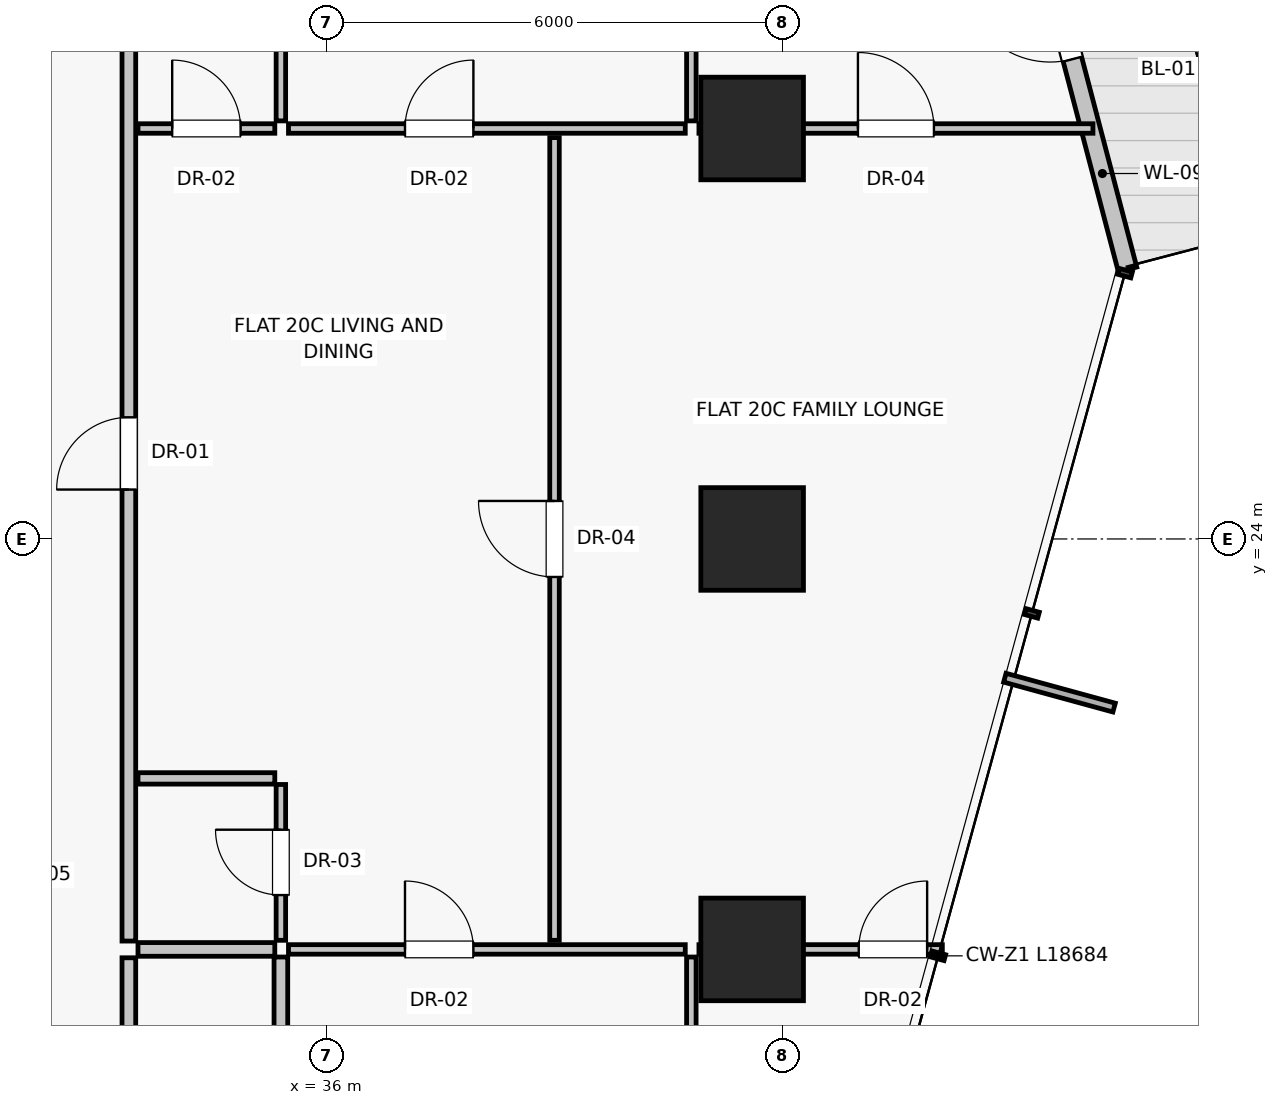
"""IFC4 building model, lengths in metres.
Left out: names, types, materials, properties, quantities, classifications, styles, units other than length and angle.
Written with IfcOpenShell. Run it as: python <this file> out.ifc"""

import sys

from ifc_helpers import new_model, si_unit, direction, frame, frame_2d, origin, origin_2d, place, context, subcontext, project, spatial, rectangle, extrude, source, transform, mapped, element, fill, save


model = new_model("IFC4")
c1 = context("Model", 3, precision=1e-05, world=origin(), true_north=direction((0.0, 1.0)))
c2 = subcontext(c1, "Body", "Model", "MODEL_VIEW")
j1 = project(units=[si_unit("LENGTHUNIT", "METRE"), si_unit("PLANEANGLEUNIT", "RADIAN")], contexts=[c1])
p1 = place(None, origin())
s1 = spatial("IfcSite", under=j1, at=p1, CompositionType="ELEMENT")
p2 = place(p1, origin())
s2 = spatial("IfcBuilding", under=s1, at=p2, CompositionType="ELEMENT")
p3 = place(p2, frame((0.0, 0.0, 73.85)))
s3 = spatial("IfcBuildingStorey", under=s2, at=p3, CompositionType="ELEMENT", Elevation=73.85)
for number, where, z_axis, x_axis in (
    (1, (41.6, 18.6, 0.0), (0.0, 0.0, 1.0), (1.0, 0.0, 0.0)),
    (2, (41.6, 24.0, 0.0), (0.0, 0.0, 1.0), (1.0, 0.0, 0.0)),
    (3, (41.6, 29.4, 0.0), (0.0, 0.0, 1.0), (1.0, 0.0, 0.0)),
):
    element("IfcColumn", number, at=place(p3, frame(where, z_axis=z_axis, x_axis=x_axis)), inside=s3, PredefinedType="COLUMN", context=c2, shape_type="SweptSolid", body=[
        extrude(rectangle(XDim=1.35, YDim=1.35, at=origin_2d()), origin(), (0.0, 0.0, 1.0), 3.25),
    ])
p4 = place(p3, frame((46.539, 27.545, 0.0), z_axis=(0.0, 0.0, 1.0), x_axis=(-0.253782183119, 0.967261393591, 0.0)))
e4 = element("IfcWall", 4, at=p4, inside=s3, PredefinedType="SOLIDWALL", context=c2, shape_type="SweptSolid", body=[
    extrude(rectangle(XDim=4.58, YDim=0.25, at=frame_2d((2.29, 0.0))), origin(), (0.0, 0.0, 1.0), 3.0),
])
p5 = place(p4, frame((2.86, 0.0, 0.0)))
e5 = element("IfcOpeningElement", 5, at=p5, cuts=e4, PredefinedType="OPENING", context=c2, shape_type="SweptSolid", body=[
    extrude(rectangle(XDim=1.15, YDim=2.25, at=frame_2d((0.575, 1.125))), frame((0.0, 0.135, 0.0), z_axis=(0.0, -1.0, 0.0), x_axis=(1.0, 0.0, 0.0)), (0.0, 0.0, 1.0), 0.27),
])
p6 = place(p3, frame((33.4, 14.31, 0.0), z_axis=(0.0, 0.0, 1.0), x_axis=(0.0, 1.0, 0.0)))
e6 = element("IfcWall", 6, at=p6, inside=s3, PredefinedType="PARTITIONING", context=c2, shape_type="SweptSolid", body=[
    extrude(rectangle(XDim=4.18, YDim=0.18, at=frame_2d((2.09, 0.0))), origin(), (0.0, 0.0, 1.0), 3.0),
])
p7 = place(p6, frame((1.59, 0.0, 0.0)))
e7 = element("IfcOpeningElement", 7, at=p7, cuts=e6, PredefinedType="OPENING", context=c2, shape_type="SweptSolid", body=[
    extrude(rectangle(XDim=1.0, YDim=2.01, at=frame_2d((0.5, 1.005))), frame((0.0, 0.1, 0.0), z_axis=(0.0, -1.0, 0.0), x_axis=(1.0, 0.0, 0.0)), (0.0, 0.0, 1.0), 0.2),
])
p8 = place(p3, frame((33.4, 18.71, 0.0), z_axis=(0.0, 0.0, 1.0), x_axis=(0.0, 1.0, 0.0)))
e8 = element("IfcWall", 8, at=p8, inside=s3, PredefinedType="PARTITIONING", context=c2, shape_type="SweptSolid", body=[
    extrude(rectangle(XDim=14.78, YDim=0.18, at=frame_2d((7.39, 0.0))), origin(), (0.0, 0.0, 1.0), 3.0),
])
p9 = place(p8, frame((5.94, 0.0, 0.0)))
e9 = element("IfcOpeningElement", 9, at=p9, cuts=e8, PredefinedType="OPENING", context=c2, shape_type="SweptSolid", body=[
    extrude(rectangle(XDim=0.95, YDim=2.02, at=frame_2d((0.475, 1.01))), frame((0.0, 0.1, 0.0), z_axis=(0.0, -1.0, 0.0), x_axis=(1.0, 0.0, 0.0)), (0.0, 0.0, 1.0), 0.2),
])
p10 = place(p3, frame((40.8, 14.32, 0.0), z_axis=(0.0, 0.0, 1.0), x_axis=(0.0, 1.0, 0.0)))
e10 = element("IfcWall", 10, at=p10, inside=s3, PredefinedType="PARTITIONING", context=c2, shape_type="SweptSolid", body=[
    extrude(rectangle(XDim=4.18, YDim=0.125, at=frame_2d((2.09, 0.0))), origin(), (0.0, 0.0, 1.0), 3.0),
])
p11 = place(p3, frame((40.9, 18.6, 0.0), z_axis=(0.0, 0.0, 1.0), x_axis=(1.0, 0.0, 0.0)))
e11 = element("IfcWall", 11, at=p11, inside=s3, PredefinedType="PARTITIONING", context=c2, shape_type="SweptSolid", body=[
    extrude(rectangle(XDim=3.202, YDim=0.125, at=frame_2d((1.601, 0.0))), origin(), (0.0, 0.0, 1.0), 2.299),
])
p12 = place(p11, frame((2.102, 0.0, 0.0)))
e12 = element("IfcOpeningElement", 12, at=p12, cuts=e11, PredefinedType="OPENING", context=c2, shape_type="SweptSolid", body=[
    extrude(rectangle(XDim=0.9, YDim=2.01, at=frame_2d((0.45, 1.005))), frame((0.0, 0.073, 0.0), z_axis=(0.0, -1.0, 0.0), x_axis=(1.0, 0.0, 0.0)), (0.0, 0.0, 1.0), 0.145),
])
p13 = place(p3, frame((40.8, 29.5, 0.0), z_axis=(0.0, 0.0, 1.0), x_axis=(0.0, 1.0, 0.0)))
e13 = element("IfcWall", 13, at=p13, inside=s3, PredefinedType="PARTITIONING", context=c2, shape_type="SweptSolid", body=[
    extrude(rectangle(XDim=3.98, YDim=0.125, at=frame_2d((1.99, 0.0))), origin(), (0.0, 0.0, 1.0), 3.0),
])
p14 = place(p3, frame((40.9, 29.4, 0.0), z_axis=(0.0, 0.0, 1.0), x_axis=(1.0, 0.0, 0.0)))
e14 = element("IfcWall", 14, at=p14, inside=s3, PredefinedType="PARTITIONING", context=c2, shape_type="SweptSolid", body=[
    extrude(rectangle(XDim=5.184, YDim=0.125, at=frame_2d((2.592, 0.0))), origin(), (0.0, 0.0, 1.0), 2.299),
])
p15 = place(p14, frame((2.092, 0.0, 0.0)))
e15 = element("IfcOpeningElement", 15, at=p15, cuts=e14, PredefinedType="OPENING", context=c2, shape_type="SweptSolid", body=[
    extrude(rectangle(XDim=1.0, YDim=2.01, at=frame_2d((0.5, 1.005))), frame((0.0, 0.073, 0.0), z_axis=(0.0, -1.0, 0.0), x_axis=(1.0, 0.0, 0.0)), (0.0, 0.0, 1.0), 0.145),
])
p16 = place(p3, frame((39.0, 18.72, 0.0), z_axis=(0.0, 0.0, 1.0), x_axis=(0.0, 1.0, 0.0)))
e16 = element("IfcWall", 16, at=p16, inside=s3, PredefinedType="PARTITIONING", context=c2, shape_type="SweptSolid", body=[
    extrude(rectangle(XDim=10.56, YDim=0.125, at=frame_2d((5.28, 0.0))), origin(), (0.0, 0.0, 1.0), 3.0),
])
p17 = place(p16, frame((4.78, 0.0, 0.0)))
e17 = element("IfcOpeningElement", 17, at=p17, cuts=e16, PredefinedType="OPENING", context=c2, shape_type="SweptSolid", body=[
    extrude(rectangle(XDim=1.0, YDim=2.01, at=frame_2d((0.5, 1.005))), frame((0.0, 0.073, 0.0), z_axis=(0.0, -1.0, 0.0), x_axis=(1.0, 0.0, 0.0)), (0.0, 0.0, 1.0), 0.145),
])
p18 = place(p3, frame((35.4, 14.32, 0.0), z_axis=(0.0, 0.0, 1.0), x_axis=(0.0, 1.0, 0.0)))
e18 = element("IfcWall", 18, at=p18, inside=s3, PredefinedType="PARTITIONING", context=c2, shape_type="SweptSolid", body=[
    extrude(rectangle(XDim=4.18, YDim=0.18, at=frame_2d((2.09, 0.0))), origin(), (0.0, 0.0, 1.0), 3.0),
])
p19 = place(p3, frame((33.52, 18.6, 0.0), z_axis=(0.0, 0.0, 1.0), x_axis=(1.0, 0.0, 0.0)))
e19 = element("IfcWall", 19, at=p19, inside=s3, PredefinedType="PARTITIONING", context=c2, shape_type="SweptSolid", body=[
    extrude(rectangle(XDim=1.8, YDim=0.18, at=frame_2d((0.9, 0.0))), origin(), (0.0, 0.0, 1.0), 3.0),
])
p20 = place(p3, frame((35.5, 18.6, 0.0), z_axis=(0.0, 0.0, 1.0), x_axis=(1.0, 0.0, 0.0)))
e20 = element("IfcWall", 20, at=p20, inside=s3, PredefinedType="PARTITIONING", context=c2, shape_type="SweptSolid", body=[
    extrude(rectangle(XDim=5.22, YDim=0.125, at=frame_2d((2.61, 0.0))), origin(), (0.0, 0.0, 1.0), 2.299),
])
p21 = place(p20, frame((1.533, 0.0, 0.0)))
e21 = element("IfcOpeningElement", 21, at=p21, cuts=e20, PredefinedType="OPENING", context=c2, shape_type="SweptSolid", body=[
    extrude(rectangle(XDim=0.9, YDim=2.01, at=frame_2d((0.45, 1.005))), frame((0.0, 0.073, 0.0), z_axis=(0.0, -1.0, 0.0), x_axis=(1.0, 0.0, 0.0)), (0.0, 0.0, 1.0), 0.145),
])
p22 = place(p3, frame((33.52, 20.85, 0.0), z_axis=(0.0, 0.0, 1.0), x_axis=(1.0, 0.0, 0.0)))
e22 = element("IfcWall", 22, at=p22, inside=s3, PredefinedType="PARTITIONING", context=c2, shape_type="SweptSolid", body=[
    extrude(rectangle(XDim=1.8, YDim=0.15, at=frame_2d((0.9, 0.0))), origin(), (0.0, 0.0, 1.0), 3.0),
])
p23 = place(p3, frame((35.4, 18.72, 0.0), z_axis=(0.0, 0.0, 1.0), x_axis=(0.0, 1.0, 0.0)))
e23 = element("IfcWall", 23, at=p23, inside=s3, PredefinedType="PARTITIONING", context=c2, shape_type="SweptSolid", body=[
    extrude(rectangle(XDim=2.05, YDim=0.125, at=frame_2d((1.025, 0.0))), origin(), (0.0, 0.0, 1.0), 3.0),
])
p24 = place(p23, frame((0.595, 0.0, 0.0)))
e24 = element("IfcOpeningElement", 24, at=p24, cuts=e23, PredefinedType="OPENING", context=c2, shape_type="SweptSolid", body=[
    extrude(rectangle(XDim=0.86, YDim=2.01, at=frame_2d((0.43, 1.005))), frame((0.0, 0.073, 0.0), z_axis=(0.0, -1.0, 0.0), x_axis=(1.0, 0.0, 0.0)), (0.0, 0.0, 1.0), 0.145),
])
p25 = place(p3, frame((33.52, 29.4, 0.0), z_axis=(0.0, 0.0, 1.0), x_axis=(1.0, 0.0, 0.0)))
e25 = element("IfcWall", 25, at=p25, inside=s3, PredefinedType="PARTITIONING", context=c2, shape_type="SweptSolid", body=[
    extrude(rectangle(XDim=1.8, YDim=0.125, at=frame_2d((0.9, 0.0))), origin(), (0.0, 0.0, 1.0), 3.0),
])
p26 = place(p25, frame((0.45, 0.0, 0.0)))
e26 = element("IfcOpeningElement", 26, at=p26, cuts=e25, PredefinedType="OPENING", context=c2, shape_type="SweptSolid", body=[
    extrude(rectangle(XDim=0.9, YDim=2.01, at=frame_2d((0.45, 1.005))), frame((0.0, 0.073, 0.0), z_axis=(0.0, -1.0, 0.0), x_axis=(1.0, 0.0, 0.0)), (0.0, 0.0, 1.0), 0.145),
])
p27 = place(p3, frame((35.4, 29.5, 0.0), z_axis=(0.0, 0.0, 1.0), x_axis=(0.0, 1.0, 0.0)))
e27 = element("IfcWall", 27, at=p27, inside=s3, PredefinedType="PARTITIONING", context=c2, shape_type="SweptSolid", body=[
    extrude(rectangle(XDim=3.98, YDim=0.125, at=frame_2d((1.99, 0.0))), origin(), (0.0, 0.0, 1.0), 3.0),
])
p28 = place(p3, frame((35.5, 29.4, 0.0), z_axis=(0.0, 0.0, 1.0), x_axis=(1.0, 0.0, 0.0)))
e28 = element("IfcWall", 28, at=p28, inside=s3, PredefinedType="PARTITIONING", context=c2, shape_type="SweptSolid", body=[
    extrude(rectangle(XDim=5.22, YDim=0.125, at=frame_2d((2.61, 0.0))), origin(), (0.0, 0.0, 1.0), 2.299),
])
p29 = place(p28, frame((1.533, 0.0, 0.0)))
e29 = element("IfcOpeningElement", 29, at=p29, cuts=e28, PredefinedType="OPENING", context=c2, shape_type="SweptSolid", body=[
    extrude(rectangle(XDim=0.9, YDim=2.01, at=frame_2d((0.45, 1.005))), frame((0.0, 0.073, 0.0), z_axis=(0.0, -1.0, 0.0), x_axis=(1.0, 0.0, 0.0)), (0.0, 0.0, 1.0), 0.145),
])
m1 = source(origin(), c2, "Body", "SweptSolid", [
    extrude(rectangle(XDim=1.15, YDim=2.25, at=frame_2d((0.575, 1.125))), frame((0.0, 0.025, 0.0), z_axis=(0.0, -1.0, 0.0), x_axis=(1.0, 0.0, 0.0)), (0.0, 0.0, 1.0), 0.05),
])
p30 = place(p5, frame((1.15, 0.0, 0.0), z_axis=(0.0, 0.0, 1.0), x_axis=(-1.0, 0.0, 0.0)))
e30 = element("IfcDoor", 30, at=p30, inside=s3, OperationType="SINGLE_SWING_RIGHT", PredefinedType="DOOR", context=c2, shape_type="MappedRepresentation", body=[
    mapped(m1, transform((0.0, 0.0, 0.0), scale=1.0)),
])
fill(e5, e30)
m2 = source(origin(), c2, "Body", "SweptSolid", [
    extrude(rectangle(XDim=0.95, YDim=2.02, at=frame_2d((0.475, 1.01))), frame((0.0, 0.025, 0.0), z_axis=(0.0, -1.0, 0.0), x_axis=(1.0, 0.0, 0.0)), (0.0, 0.0, 1.0), 0.05),
])
p31 = place(p9, origin())
e31 = element("IfcDoor", 31, at=p31, inside=s3, OperationType="SINGLE_SWING_LEFT", PredefinedType="DOOR", context=c2, shape_type="MappedRepresentation", body=[
    mapped(m2, transform((0.0, 0.0, 0.0), scale=1.0)),
])
fill(e9, e31)
m3 = source(origin(), c2, "Body", "SweptSolid", [
    extrude(rectangle(XDim=0.9, YDim=2.01, at=frame_2d((0.45, 1.005))), frame((0.0, 0.025, 0.0), z_axis=(0.0, -1.0, 0.0), x_axis=(1.0, 0.0, 0.0)), (0.0, 0.0, 1.0), 0.05),
])
p32 = place(p12, origin())
e32 = element("IfcDoor", 32, at=p32, inside=s3, OperationType="SINGLE_SWING_RIGHT", PredefinedType="DOOR", context=c2, shape_type="MappedRepresentation", body=[
    mapped(m3, transform((0.0, 0.0, 0.0), scale=1.0)),
])
fill(e12, e32)
m4 = source(origin(), c2, "Body", "SweptSolid", [
    extrude(rectangle(XDim=1.0, YDim=2.01, at=frame_2d((0.5, 1.005))), frame((0.0, 0.025, 0.0), z_axis=(0.0, -1.0, 0.0), x_axis=(1.0, 0.0, 0.0)), (0.0, 0.0, 1.0), 0.05),
])
p33 = place(p15, origin())
e33 = element("IfcDoor", 33, at=p33, inside=s3, OperationType="SINGLE_SWING_LEFT", PredefinedType="DOOR", context=c2, shape_type="MappedRepresentation", body=[
    mapped(m4, transform((0.0, 0.0, 0.0), scale=1.0)),
])
fill(e15, e33)
p34 = place(p17, origin())
e34 = element("IfcDoor", 34, at=p34, inside=s3, OperationType="SINGLE_SWING_RIGHT", PredefinedType="DOOR", context=c2, shape_type="MappedRepresentation", body=[
    mapped(m4, transform((0.0, 0.0, 0.0), scale=1.0)),
])
fill(e17, e34)
p35 = place(p21, origin())
e35 = element("IfcDoor", 35, at=p35, inside=s3, OperationType="SINGLE_SWING_LEFT", PredefinedType="DOOR", context=c2, shape_type="MappedRepresentation", body=[
    mapped(m3, transform((0.0, 0.0, 0.0), scale=1.0)),
])
fill(e21, e35)
m5 = source(origin(), c2, "Body", "SweptSolid", [
    extrude(rectangle(XDim=0.86, YDim=2.01, at=frame_2d((0.43, 1.005))), frame((0.0, 0.025, 0.0), z_axis=(0.0, -1.0, 0.0), x_axis=(1.0, 0.0, 0.0)), (0.0, 0.0, 1.0), 0.05),
])
p36 = place(p24, origin())
e36 = element("IfcDoor", 36, at=p36, inside=s3, OperationType="SINGLE_SWING_RIGHT", PredefinedType="DOOR", context=c2, shape_type="MappedRepresentation", body=[
    mapped(m5, transform((0.0, 0.0, 0.0), scale=1.0)),
])
fill(e24, e36)
p37 = place(p26, origin())
e37 = element("IfcDoor", 37, at=p37, inside=s3, OperationType="SINGLE_SWING_LEFT", PredefinedType="DOOR", context=c2, shape_type="MappedRepresentation", body=[
    mapped(m3, transform((0.0, 0.0, 0.0), scale=1.0)),
])
fill(e26, e37)
p38 = place(p29, origin())
e38 = element("IfcDoor", 38, at=p38, inside=s3, OperationType="SINGLE_SWING_RIGHT", PredefinedType="DOOR", context=c2, shape_type="MappedRepresentation", body=[
    mapped(m3, transform((0.0, 0.0, 0.0), scale=1.0)),
])
fill(e29, e38)
save(model, sys.argv[1])
